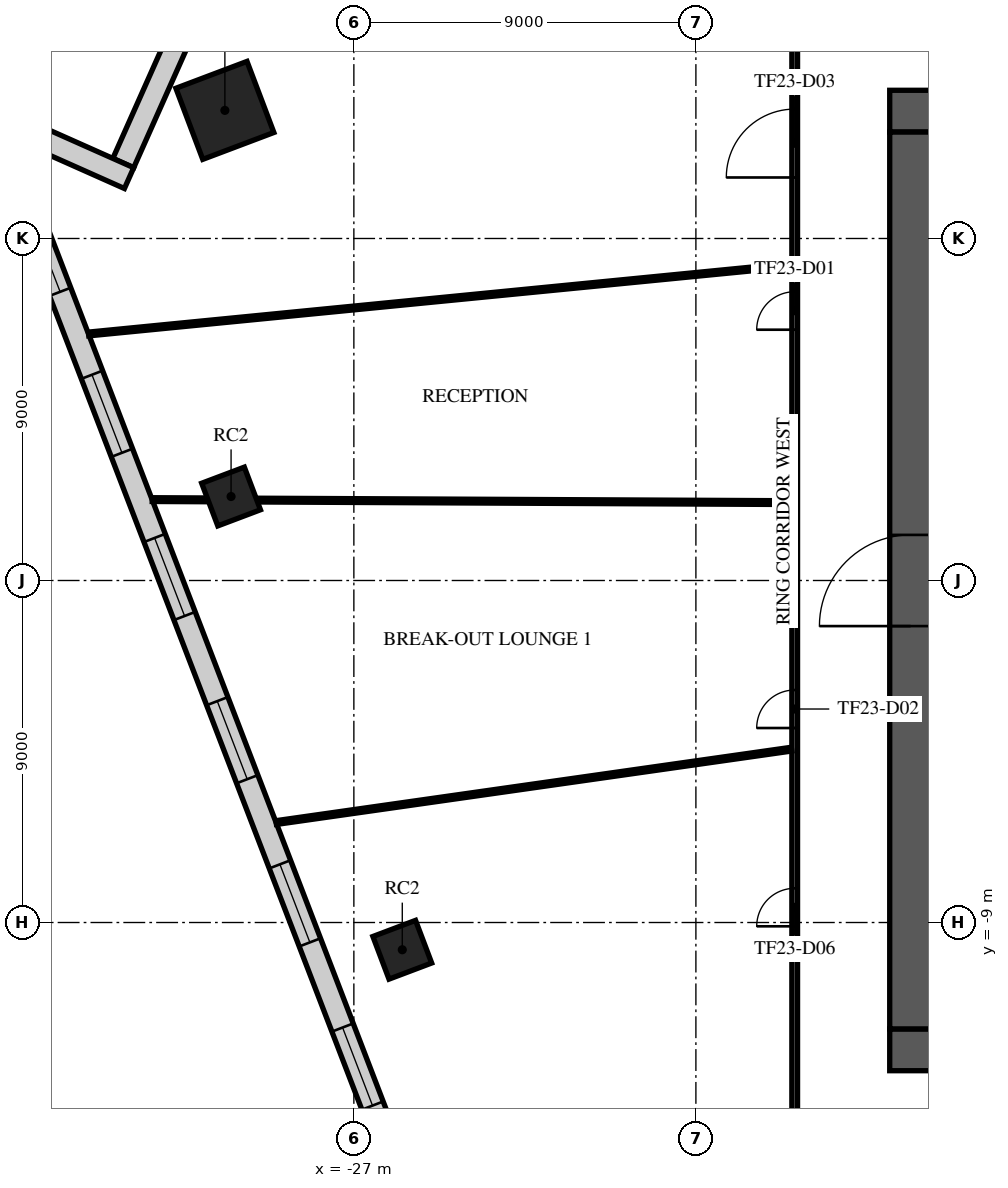
"""IFC4 building model, lengths in metres.
Left out: names, types, materials, properties, quantities, classifications, styles, units other than length and angle.
Written with IfcOpenShell. Run it as: python <this file> out.ifc"""

import sys

from ifc_helpers import new_model, si_unit, direction, frame, frame_2d, origin, origin_2d, place, context, subcontext, project, spatial, rectangle, extrude, element, fill, save


model = new_model("IFC4")
c1 = context("Model", 3, precision=1e-05, world=origin(), true_north=direction((0.0, 1.0)))
c2 = subcontext(c1, "Body", "Model", "MODEL_VIEW")
j1 = project(units=[si_unit("LENGTHUNIT", "METRE"), si_unit("PLANEANGLEUNIT", "RADIAN")], contexts=[c1])
p1 = place(None, origin())
s1 = spatial("IfcSite", under=j1, at=p1, CompositionType="ELEMENT")
p2 = place(p1, origin())
s2 = spatial("IfcBuilding", under=s1, at=p2, CompositionType="ELEMENT")
p3 = place(p2, frame((0.0, 0.0, 102.1)))
s3 = spatial("IfcBuildingStorey", under=s2, at=p3, CompositionType="ELEMENT", Elevation=102.1)
p4 = place(p3, frame((-30.394, 12.371, 0.0), z_axis=(0.0, 0.0, 1.0), x_axis=(0.935491525991, 0.353349125935, 0.0)))
e1 = element("IfcColumn", 1, at=p4, inside=s3, PredefinedType="COLUMN", context=c2, shape_type="SweptSolid", body=[
    extrude(rectangle(XDim=2.0, YDim=2.0, at=origin_2d()), origin(), (0.0, 0.0, 1.0), 4.0),
])
for number, where, z_axis, x_axis in (
    (2, (-30.231, 2.21, 0.0), (0.0, 0.0, 1.0), (0.935, 0.353, 0.0)),
    (3, (-25.726, -9.717, 0.0), (0.0, 0.0, 1.0), (0.935, 0.353, 0.0)),
):
    element("IfcColumn", number, at=place(p3, frame(where, z_axis=z_axis, x_axis=x_axis)), inside=s3, PredefinedType="COLUMN", context=c2, shape_type="SweptSolid", body=[
        extrude(rectangle(XDim=1.2, YDim=1.2, at=origin_2d()), origin(), (0.0, 0.0, 1.0), 4.0),
    ])
p5 = place(p3, frame((-12.9, 12.35, 0.0), z_axis=(0.0, 0.0, 1.0), x_axis=(1.0, 0.0, 0.0)))
e4 = element("IfcWall", 4, at=p5, inside=s3, PredefinedType="SHEAR", context=c2, shape_type="SweptSolid", body=[
    extrude(rectangle(XDim=25.8, YDim=1.1, at=frame_2d((12.9, 0.0))), origin(), (0.0, 0.0, 1.0), 3.58),
])
p6 = place(p5, frame((11.7, 0.0, 0.0)))
e5 = element("IfcOpeningElement", 5, at=p6, cuts=e4, PredefinedType="OPENING", context=c2, shape_type="SweptSolid", body=[
    extrude(rectangle(XDim=2.4, YDim=2.4, at=frame_2d((1.2, 1.2))), frame((0.0, 0.56, 0.0), z_axis=(0.0, -1.0, 0.0), x_axis=(1.0, 0.0, 0.0)), (0.0, 0.0, 1.0), 1.12),
])
p7 = place(p5, frame((22.525, 0.0, 0.0)))
e6 = element("IfcOpeningElement", 6, at=p7, cuts=e4, PredefinedType="OPENING", context=c2, shape_type="SweptSolid", body=[
    extrude(rectangle(XDim=1.2, YDim=2.1, at=frame_2d((0.6, 1.05))), frame((0.0, 0.56, 0.0), z_axis=(0.0, -1.0, 0.0), x_axis=(1.0, 0.0, 0.0)), (0.0, 0.0, 1.0), 1.12),
])
p8 = place(p5, frame((1.5, 0.0, 0.0)))
e7 = element("IfcOpeningElement", 7, at=p8, cuts=e4, PredefinedType="OPENING", context=c2, shape_type="SweptSolid", body=[
    extrude(rectangle(XDim=1.0, YDim=2.1, at=frame_2d((0.5, 1.05))), frame((0.0, 0.56, 0.0), z_axis=(0.0, -1.0, 0.0), x_axis=(1.0, 0.0, 0.0)), (0.0, 0.0, 1.0), 1.12),
])
p9 = place(p3, frame((-12.9, -12.35, 0.0), z_axis=(0.0, 0.0, 1.0), x_axis=(1.0, 0.0, 0.0)))
e8 = element("IfcWall", 8, at=p9, inside=s3, PredefinedType="SHEAR", context=c2, shape_type="SweptSolid", body=[
    extrude(rectangle(XDim=25.8, YDim=1.1, at=frame_2d((12.9, 0.0))), origin(), (0.0, 0.0, 1.0), 3.58),
])
p10 = place(p9, frame((7.8, 0.0, 0.0)))
e9 = element("IfcOpeningElement", 9, at=p10, cuts=e8, PredefinedType="OPENING", context=c2, shape_type="SweptSolid", body=[
    extrude(rectangle(XDim=2.0, YDim=2.1, at=frame_2d((1.0, 1.05))), frame((0.0, 0.56, 0.0), z_axis=(0.0, -1.0, 0.0), x_axis=(1.0, 0.0, 0.0)), (0.0, 0.0, 1.0), 1.12),
])
p11 = place(p9, frame((17.925, 0.0, 0.0)))
e10 = element("IfcOpeningElement", 10, at=p11, cuts=e8, PredefinedType="OPENING", context=c2, shape_type="SweptSolid", body=[
    extrude(rectangle(XDim=1.2, YDim=2.1, at=frame_2d((0.6, 1.05))), frame((0.0, 0.56, 0.0), z_axis=(0.0, -1.0, 0.0), x_axis=(1.0, 0.0, 0.0)), (0.0, 0.0, 1.0), 1.12),
])
p12 = place(p9, frame((2.075, 0.0, 0.0)))
e11 = element("IfcOpeningElement", 11, at=p12, cuts=e8, PredefinedType="OPENING", context=c2, shape_type="SweptSolid", body=[
    extrude(rectangle(XDim=1.2, YDim=2.1, at=frame_2d((0.6, 1.05))), frame((0.0, 0.56, 0.0), z_axis=(0.0, -1.0, 0.0), x_axis=(1.0, 0.0, 0.0)), (0.0, 0.0, 1.0), 1.12),
])
p13 = place(p9, frame((22.525, 0.0, 0.0)))
e12 = element("IfcOpeningElement", 12, at=p13, cuts=e8, PredefinedType="OPENING", context=c2, shape_type="SweptSolid", body=[
    extrude(rectangle(XDim=1.2, YDim=2.1, at=frame_2d((0.6, 1.05))), frame((0.0, 0.56, 0.0), z_axis=(0.0, -1.0, 0.0), x_axis=(1.0, 0.0, 0.0)), (0.0, 0.0, 1.0), 1.12),
])
p14 = place(p3, frame((-12.35, -11.8, 0.0), z_axis=(0.0, 0.0, 1.0), x_axis=(0.0, 1.0, 0.0)))
e13 = element("IfcWall", 13, at=p14, inside=s3, PredefinedType="SHEAR", context=c2, shape_type="SweptSolid", body=[
    extrude(rectangle(XDim=23.6, YDim=1.1, at=frame_2d((11.8, 0.0))), origin(), (0.0, 0.0, 1.0), 3.58),
])
p15 = place(p14, frame((10.6, 0.0, 0.0)))
e14 = element("IfcOpeningElement", 14, at=p15, cuts=e13, PredefinedType="OPENING", context=c2, shape_type="SweptSolid", body=[
    extrude(rectangle(XDim=2.4, YDim=2.4, at=frame_2d((1.2, 1.2))), frame((0.0, 0.56, 0.0), z_axis=(0.0, -1.0, 0.0), x_axis=(1.0, 0.0, 0.0)), (0.0, 0.0, 1.0), 1.12),
])
p16 = place(p3, frame((-31.44, 14.639, 0.0), z_axis=(0.0, 0.0, 1.0), x_axis=(-0.406727323635, -0.913549606868, 0.0)))
e15 = element("IfcWall", 15, at=p16, inside=s3, PredefinedType="STANDARD", context=c2, shape_type="SweptSolid", body=[
    extrude(rectangle(XDim=4.0, YDim=0.6, at=frame_2d((2.0, 0.0))), origin(), (0.0, 0.0, 1.0), 3.58),
])
p17 = place(p3, frame((-32.915, 10.589, 0.0), z_axis=(0.0, 0.0, 1.0), x_axis=(-0.913549606868, 0.406727323635, 0.0)))
e16 = element("IfcWall", 16, at=p17, inside=s3, PredefinedType="STANDARD", context=c2, shape_type="SweptSolid", body=[
    extrude(rectangle(XDim=2.5, YDim=0.6, at=frame_2d((1.25, 0.0))), origin(), (0.0, 0.0, 1.0), 3.58),
])
p18 = place(p3, frame((-35.925, 10.713, 0.0), z_axis=(0.0, 0.0, 1.0), x_axis=(0.358368969683, -0.933580034902, 0.0)))
e17 = element("IfcWall", 17, at=p18, inside=s3, PredefinedType="STANDARD", context=c2, shape_type="SweptSolid", body=[
    extrude(rectangle(XDim=45.752, YDim=0.6, at=frame_2d((22.876, 0.0))), origin(), (0.0, 0.0, 1.0), 3.58),
])
p19 = place(p18, frame((1.138, 0.0, 0.9)))
e18 = element("IfcOpeningElement", 18, at=p19, cuts=e17, PredefinedType="OPENING", context=c2, shape_type="SweptSolid", body=[
    extrude(rectangle(XDim=2.2, YDim=2.1, at=frame_2d((1.1, 1.05))), frame((0.0, 0.31, 0.0), z_axis=(0.0, -1.0, 0.0), x_axis=(1.0, 0.0, 0.0)), (0.0, 0.0, 1.0), 0.62),
])
p20 = place(p18, frame((5.676, 0.0, 0.9)))
e19 = element("IfcOpeningElement", 19, at=p20, cuts=e17, PredefinedType="OPENING", context=c2, shape_type="SweptSolid", body=[
    extrude(rectangle(XDim=2.2, YDim=2.1, at=frame_2d((1.1, 1.05))), frame((0.0, 0.31, 0.0), z_axis=(0.0, -1.0, 0.0), x_axis=(1.0, 0.0, 0.0)), (0.0, 0.0, 1.0), 0.62),
])
p21 = place(p18, frame((10.276, 0.0, 0.9)))
e20 = element("IfcOpeningElement", 20, at=p21, cuts=e17, PredefinedType="OPENING", context=c2, shape_type="SweptSolid", body=[
    extrude(rectangle(XDim=2.2, YDim=2.1, at=frame_2d((1.1, 1.05))), frame((0.0, 0.31, 0.0), z_axis=(0.0, -1.0, 0.0), x_axis=(1.0, 0.0, 0.0)), (0.0, 0.0, 1.0), 0.62),
])
p22 = place(p18, frame((14.876, 0.0, 0.9)))
e21 = element("IfcOpeningElement", 21, at=p22, cuts=e17, PredefinedType="OPENING", context=c2, shape_type="SweptSolid", body=[
    extrude(rectangle(XDim=2.2, YDim=2.1, at=frame_2d((1.1, 1.05))), frame((0.0, 0.31, 0.0), z_axis=(0.0, -1.0, 0.0), x_axis=(1.0, 0.0, 0.0)), (0.0, 0.0, 1.0), 0.62),
])
p23 = place(p18, frame((19.476, 0.0, 0.9)))
e22 = element("IfcOpeningElement", 22, at=p23, cuts=e17, PredefinedType="OPENING", context=c2, shape_type="SweptSolid", body=[
    extrude(rectangle(XDim=2.2, YDim=2.1, at=frame_2d((1.1, 1.05))), frame((0.0, 0.31, 0.0), z_axis=(0.0, -1.0, 0.0), x_axis=(1.0, 0.0, 0.0)), (0.0, 0.0, 1.0), 0.62),
])
p24 = place(p18, frame((24.076, 0.0, 0.9)))
e23 = element("IfcOpeningElement", 23, at=p24, cuts=e17, PredefinedType="OPENING", context=c2, shape_type="SweptSolid", body=[
    extrude(rectangle(XDim=2.2, YDim=2.1, at=frame_2d((1.1, 1.05))), frame((0.0, 0.31, 0.0), z_axis=(0.0, -1.0, 0.0), x_axis=(1.0, 0.0, 0.0)), (0.0, 0.0, 1.0), 0.62),
])
p25 = place(p18, frame((28.676, 0.0, 0.9)))
e24 = element("IfcOpeningElement", 24, at=p25, cuts=e17, PredefinedType="OPENING", context=c2, shape_type="SweptSolid", body=[
    extrude(rectangle(XDim=2.2, YDim=2.1, at=frame_2d((1.1, 1.05))), frame((0.0, 0.31, 0.0), z_axis=(0.0, -1.0, 0.0), x_axis=(1.0, 0.0, 0.0)), (0.0, 0.0, 1.0), 0.62),
])
p26 = place(p18, frame((33.276, 0.0, 0.9)))
e25 = element("IfcOpeningElement", 25, at=p26, cuts=e17, PredefinedType="OPENING", context=c2, shape_type="SweptSolid", body=[
    extrude(rectangle(XDim=2.2, YDim=2.1, at=frame_2d((1.1, 1.05))), frame((0.0, 0.31, 0.0), z_axis=(0.0, -1.0, 0.0), x_axis=(1.0, 0.0, 0.0)), (0.0, 0.0, 1.0), 0.62),
])
p27 = place(p18, frame((37.876, 0.0, 0.9)))
e26 = element("IfcOpeningElement", 26, at=p27, cuts=e17, PredefinedType="OPENING", context=c2, shape_type="SweptSolid", body=[
    extrude(rectangle(XDim=2.2, YDim=2.1, at=frame_2d((1.1, 1.05))), frame((0.0, 0.31, 0.0), z_axis=(0.0, -1.0, 0.0), x_axis=(1.0, 0.0, 0.0)), (0.0, 0.0, 1.0), 0.62),
])
p28 = place(p18, frame((42.414, 0.0, 0.9)))
e27 = element("IfcOpeningElement", 27, at=p28, cuts=e17, PredefinedType="OPENING", context=c2, shape_type="SweptSolid", body=[
    extrude(rectangle(XDim=2.2, YDim=2.1, at=frame_2d((1.1, 1.05))), frame((0.0, 0.31, 0.0), z_axis=(0.0, -1.0, 0.0), x_axis=(1.0, 0.0, 0.0)), (0.0, 0.0, 1.0), 0.62),
])
p29 = place(p3, frame((-15.4, -15.4, 0.0), z_axis=(0.0, 0.0, 1.0), x_axis=(0.0, 1.0, 0.0)))
e28 = element("IfcWall", 28, at=p29, inside=s3, PredefinedType="PARTITIONING", context=c2, shape_type="SweptSolid", body=[
    extrude(rectangle(XDim=30.8, YDim=0.15, at=frame_2d((15.4, 0.0))), origin(), (0.0, 0.0, 1.0), 3.08),
])
p30 = place(p29, frame((21.999, 0.0, 0.0)))
e29 = element("IfcOpeningElement", 29, at=p30, cuts=e28, PredefinedType="OPENING", context=c2, shape_type="SweptSolid", body=[
    extrude(rectangle(XDim=1.0, YDim=2.1, at=frame_2d((0.5, 1.05))), frame((0.0, 0.085, 0.0), z_axis=(0.0, -1.0, 0.0), x_axis=(1.0, 0.0, 0.0)), (0.0, 0.0, 1.0), 0.17),
])
p31 = place(p29, frame((11.518, 0.0, 0.0)))
e30 = element("IfcOpeningElement", 30, at=p31, cuts=e28, PredefinedType="OPENING", context=c2, shape_type="SweptSolid", body=[
    extrude(rectangle(XDim=1.0, YDim=2.1, at=frame_2d((0.5, 1.05))), frame((0.0, 0.085, 0.0), z_axis=(0.0, -1.0, 0.0), x_axis=(1.0, 0.0, 0.0)), (0.0, 0.0, 1.0), 0.17),
])
p32 = place(p29, frame((26.005, 0.0, 0.0)))
e31 = element("IfcOpeningElement", 31, at=p32, cuts=e28, PredefinedType="OPENING", context=c2, shape_type="SweptSolid", body=[
    extrude(rectangle(XDim=1.8, YDim=2.1, at=frame_2d((0.9, 1.05))), frame((0.0, 0.085, 0.0), z_axis=(0.0, -1.0, 0.0), x_axis=(1.0, 0.0, 0.0)), (0.0, 0.0, 1.0), 0.17),
])
p33 = place(p29, frame((6.3, 0.0, 0.0)))
e32 = element("IfcOpeningElement", 32, at=p33, cuts=e28, PredefinedType="OPENING", context=c2, shape_type="SweptSolid", body=[
    extrude(rectangle(XDim=1.0, YDim=2.1, at=frame_2d((0.5, 1.05))), frame((0.0, 0.085, 0.0), z_axis=(0.0, -1.0, 0.0), x_axis=(1.0, 0.0, 0.0)), (0.0, 0.0, 1.0), 0.17),
])
p34 = place(p3, frame((-33.98, 6.487, 0.0), z_axis=(0.0, 0.0, 1.0), x_axis=(0.995224598135, 0.097611470978, 0.0)))
e33 = element("IfcWall", 33, at=p34, inside=s3, PredefinedType="PARTITIONING", context=c2, shape_type="SweptSolid", body=[
    extrude(rectangle(XDim=18.589, YDim=0.1, at=frame_2d((9.294, 0.0))), origin(), (0.0, 0.0, 1.0), 2.83),
])
p35 = place(p3, frame((-32.307, 2.129, 0.0), z_axis=(0.0, 0.0, 1.0), x_axis=(0.999989154713, -0.004657301452, 0.0)))
e34 = element("IfcWall", 34, at=p35, inside=s3, PredefinedType="PARTITIONING", context=c2, shape_type="SweptSolid", body=[
    extrude(rectangle(XDim=1.468, YDim=0.1, at=frame_2d((0.734, 0.0))), origin(), (0.0, 0.0, 1.0), 3.58),
])
p36 = place(p3, frame((-29.554, 2.116, 0.0), z_axis=(0.0, 0.0, 1.0), x_axis=(0.999988794836, -0.004733941545, 0.0)))
e35 = element("IfcWall", 35, at=p36, inside=s3, PredefinedType="PARTITIONING", context=c2, shape_type="SweptSolid", body=[
    extrude(rectangle(XDim=14.079, YDim=0.1, at=frame_2d((7.04, 0.0))), origin(), (0.0, 0.0, 1.0), 2.96),
])
p37 = place(p3, frame((-29.044, -6.37, 0.0), z_axis=(0.0, 0.0, 1.0), x_axis=(0.990003953949, 0.141039608496, 0.0)))
e36 = element("IfcWall", 36, at=p37, inside=s3, PredefinedType="PARTITIONING", context=c2, shape_type="SweptSolid", body=[
    extrude(rectangle(XDim=13.699, YDim=0.1, at=frame_2d((6.85, 0.0))), origin(), (0.0, 0.0, 1.0), 2.83),
])
p38 = place(p15, origin())
e37 = element("IfcDoor", 37, at=p38, inside=s3, OperationType="SINGLE_SWING_LEFT", PredefinedType="DOOR", context=c2, shape_type="SweptSolid", body=[
    extrude(rectangle(XDim=2.4, YDim=2.4, at=frame_2d((1.2, 1.2))), frame((0.0, 0.025, 0.0), z_axis=(0.0, -1.0, 0.0), x_axis=(1.0, 0.0, 0.0)), (0.0, 0.0, 1.0), 0.05),
])
fill(e14, e37)
p39 = place(p19, origin())
e38 = element("IfcWindow", 38, at=p39, inside=s3, PartitioningType="SINGLE_PANEL", PredefinedType="WINDOW", context=c2, shape_type="SweptSolid", body=[
    extrude(rectangle(XDim=2.2, YDim=2.1, at=frame_2d((1.1, 1.05))), frame((0.0, 0.03, 0.0), z_axis=(0.0, -1.0, 0.0), x_axis=(1.0, 0.0, 0.0)), (0.0, 0.0, 1.0), 0.06),
])
fill(e18, e38)
p40 = place(p20, origin())
e39 = element("IfcWindow", 39, at=p40, inside=s3, PartitioningType="SINGLE_PANEL", PredefinedType="WINDOW", context=c2, shape_type="SweptSolid", body=[
    extrude(rectangle(XDim=2.2, YDim=2.1, at=frame_2d((1.1, 1.05))), frame((0.0, 0.03, 0.0), z_axis=(0.0, -1.0, 0.0), x_axis=(1.0, 0.0, 0.0)), (0.0, 0.0, 1.0), 0.06),
])
fill(e19, e39)
p41 = place(p21, origin())
e40 = element("IfcWindow", 40, at=p41, inside=s3, PartitioningType="SINGLE_PANEL", PredefinedType="WINDOW", context=c2, shape_type="SweptSolid", body=[
    extrude(rectangle(XDim=2.2, YDim=2.1, at=frame_2d((1.1, 1.05))), frame((0.0, 0.03, 0.0), z_axis=(0.0, -1.0, 0.0), x_axis=(1.0, 0.0, 0.0)), (0.0, 0.0, 1.0), 0.06),
])
fill(e20, e40)
p42 = place(p22, origin())
e41 = element("IfcWindow", 41, at=p42, inside=s3, PartitioningType="SINGLE_PANEL", PredefinedType="WINDOW", context=c2, shape_type="SweptSolid", body=[
    extrude(rectangle(XDim=2.2, YDim=2.1, at=frame_2d((1.1, 1.05))), frame((0.0, 0.03, 0.0), z_axis=(0.0, -1.0, 0.0), x_axis=(1.0, 0.0, 0.0)), (0.0, 0.0, 1.0), 0.06),
])
fill(e21, e41)
p43 = place(p23, origin())
e42 = element("IfcWindow", 42, at=p43, inside=s3, PartitioningType="SINGLE_PANEL", PredefinedType="WINDOW", context=c2, shape_type="SweptSolid", body=[
    extrude(rectangle(XDim=2.2, YDim=2.1, at=frame_2d((1.1, 1.05))), frame((0.0, 0.03, 0.0), z_axis=(0.0, -1.0, 0.0), x_axis=(1.0, 0.0, 0.0)), (0.0, 0.0, 1.0), 0.06),
])
fill(e22, e42)
p44 = place(p24, origin())
e43 = element("IfcWindow", 43, at=p44, inside=s3, PartitioningType="SINGLE_PANEL", PredefinedType="WINDOW", context=c2, shape_type="SweptSolid", body=[
    extrude(rectangle(XDim=2.2, YDim=2.1, at=frame_2d((1.1, 1.05))), frame((0.0, 0.03, 0.0), z_axis=(0.0, -1.0, 0.0), x_axis=(1.0, 0.0, 0.0)), (0.0, 0.0, 1.0), 0.06),
])
fill(e23, e43)
p45 = place(p30, origin())
e44 = element("IfcDoor", 44, at=p45, inside=s3, OperationType="SINGLE_SWING_LEFT", PredefinedType="DOOR", context=c2, shape_type="SweptSolid", body=[
    extrude(rectangle(XDim=1.0, YDim=2.1, at=frame_2d((0.5, 1.05))), frame((0.0, 0.025, 0.0), z_axis=(0.0, -1.0, 0.0), x_axis=(1.0, 0.0, 0.0)), (0.0, 0.0, 1.0), 0.05),
])
fill(e29, e44)
p46 = place(p31, origin())
e45 = element("IfcDoor", 45, at=p46, inside=s3, OperationType="SINGLE_SWING_RIGHT", PredefinedType="DOOR", context=c2, shape_type="SweptSolid", body=[
    extrude(rectangle(XDim=1.0, YDim=2.1, at=frame_2d((0.5, 1.05))), frame((0.0, 0.025, 0.0), z_axis=(0.0, -1.0, 0.0), x_axis=(1.0, 0.0, 0.0)), (0.0, 0.0, 1.0), 0.05),
])
fill(e30, e45)
p47 = place(p32, origin())
e46 = element("IfcDoor", 46, at=p47, inside=s3, OperationType="DOUBLE_DOOR_SINGLE_SWING", PredefinedType="DOOR", context=c2, shape_type="SweptSolid", body=[
    extrude(rectangle(XDim=1.8, YDim=2.1, at=frame_2d((0.9, 1.05))), frame((0.0, 0.025, 0.0), z_axis=(0.0, -1.0, 0.0), x_axis=(1.0, 0.0, 0.0)), (0.0, 0.0, 1.0), 0.05),
])
fill(e31, e46)
p48 = place(p33, origin())
e47 = element("IfcDoor", 47, at=p48, inside=s3, OperationType="SINGLE_SWING_RIGHT", PredefinedType="DOOR", context=c2, shape_type="SweptSolid", body=[
    extrude(rectangle(XDim=1.0, YDim=2.1, at=frame_2d((0.5, 1.05))), frame((0.0, 0.025, 0.0), z_axis=(0.0, -1.0, 0.0), x_axis=(1.0, 0.0, 0.0)), (0.0, 0.0, 1.0), 0.05),
])
fill(e32, e47)
save(model, sys.argv[1])
